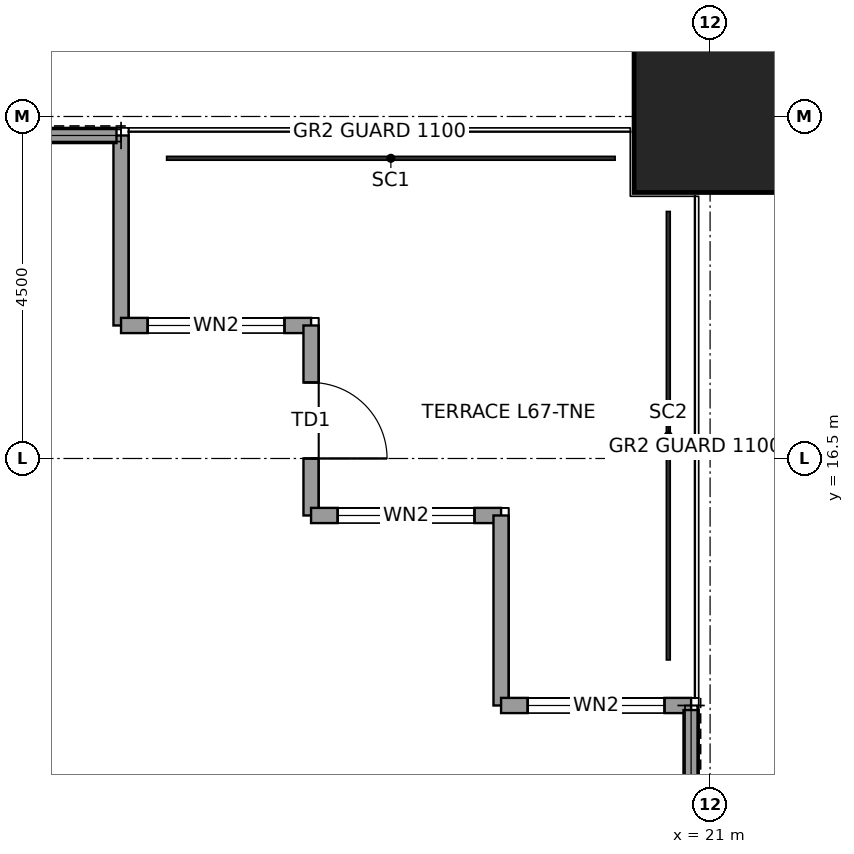
"""IFC4 building model, lengths in metres.
Left out: names, types, materials, properties, quantities, classifications, styles, units other than length and angle.
Written with IfcOpenShell. Run it as: python <this file> out.ifc"""

import sys

from ifc_helpers import new_model, si_unit, direction, frame, frame_2d, origin, origin_2d, place, context, subcontext, project, spatial, rectangle, hollow_rectangle, extrude, element, fill, save


model = new_model("IFC4")
c1 = context("Model", 3, precision=1e-05, world=origin(), true_north=direction((0.0, 1.0)))
c2 = subcontext(c1, "Body", "Model", "MODEL_VIEW")
j1 = project(units=[si_unit("LENGTHUNIT", "METRE"), si_unit("PLANEANGLEUNIT", "RADIAN")], contexts=[c1])
p1 = place(None, origin())
s1 = spatial("IfcSite", under=j1, at=p1, CompositionType="ELEMENT")
p2 = place(p1, origin())
s2 = spatial("IfcBuilding", under=s1, at=p2, CompositionType="ELEMENT")
p3 = place(p2, frame((0.0, 0.0, 303.9)))
s3 = spatial("IfcBuildingStorey", under=s2, at=p3, CompositionType="ELEMENT", Elevation=303.9)
p4 = place(p3, frame((21.0, 21.0, 0.0), z_axis=(0.0, 0.0, 1.0), x_axis=(1.0, 0.0, 0.0)))
e1 = element("IfcColumn", 1, at=p4, inside=s3, PredefinedType="COLUMN", context=c2, shape_type="SweptSolid", body=[
    extrude(hollow_rectangle(XDim=2.0, YDim=2.0, WallThickness=0.095, at=origin_2d()), origin(), (0.0, 0.0, 1.0), 4.0),
])
p5 = place(p3, frame((13.25, 20.75, 0.0), z_axis=(0.0, 0.0, 1.0), x_axis=(0.0, -1.0, 0.0)))
e2 = element("IfcWall", 2, at=p5, inside=s3, PredefinedType="SOLIDWALL", context=c2, shape_type="SweptSolid", body=[
    extrude(rectangle(XDim=2.5, YDim=0.2, at=frame_2d((1.25, 0.0))), origin(), (0.0, 0.0, 1.0), 3.85),
])
p6 = place(p3, frame((13.25, 18.25, 0.0), z_axis=(0.0, 0.0, 1.0), x_axis=(1.0, 0.0, 0.0)))
e3 = element("IfcWall", 3, at=p6, inside=s3, PredefinedType="SOLIDWALL", context=c2, shape_type="SweptSolid", body=[
    extrude(rectangle(XDim=2.5, YDim=0.2, at=frame_2d((1.25, 0.0))), origin(), (0.0, 0.0, 1.0), 3.85),
])
p7 = place(p6, frame((0.35, 0.0, 0.3)))
e4 = element("IfcOpeningElement", 4, at=p7, cuts=e3, PredefinedType="OPENING", context=c2, shape_type="SweptSolid", body=[
    extrude(rectangle(XDim=1.8, YDim=2.4, at=frame_2d((0.9, 1.2))), frame((0.0, 0.11, 0.0), z_axis=(0.0, -1.0, 0.0), x_axis=(1.0, 0.0, 0.0)), (0.0, 0.0, 1.0), 0.22),
])
p8 = place(p3, frame((15.75, 18.25, 0.0), z_axis=(0.0, 0.0, 1.0), x_axis=(0.0, -1.0, 0.0)))
e5 = element("IfcWall", 5, at=p8, inside=s3, PredefinedType="SOLIDWALL", context=c2, shape_type="SweptSolid", body=[
    extrude(rectangle(XDim=2.5, YDim=0.2, at=frame_2d((1.25, 0.0))), origin(), (0.0, 0.0, 1.0), 3.317),
])
p9 = place(p8, frame((0.75, 0.0, 0.0)))
e6 = element("IfcOpeningElement", 6, at=p9, cuts=e5, PredefinedType="OPENING", context=c2, shape_type="SweptSolid", body=[
    extrude(rectangle(XDim=1.0, YDim=2.4, at=frame_2d((0.5, 1.2))), frame((0.0, 0.11, 0.0), z_axis=(0.0, -1.0, 0.0), x_axis=(1.0, 0.0, 0.0)), (0.0, 0.0, 1.0), 0.22),
])
p10 = place(p3, frame((15.75, 15.75, 0.0), z_axis=(0.0, 0.0, 1.0), x_axis=(1.0, 0.0, 0.0)))
e7 = element("IfcWall", 7, at=p10, inside=s3, PredefinedType="SOLIDWALL", context=c2, shape_type="SweptSolid", body=[
    extrude(rectangle(XDim=2.5, YDim=0.2, at=frame_2d((1.25, 0.0))), origin(), (0.0, 0.0, 1.0), 3.85),
])
p11 = place(p10, frame((0.35, 0.0, 0.3)))
e8 = element("IfcOpeningElement", 8, at=p11, cuts=e7, PredefinedType="OPENING", context=c2, shape_type="SweptSolid", body=[
    extrude(rectangle(XDim=1.8, YDim=2.4, at=frame_2d((0.9, 1.2))), frame((0.0, 0.11, 0.0), z_axis=(0.0, -1.0, 0.0), x_axis=(1.0, 0.0, 0.0)), (0.0, 0.0, 1.0), 0.22),
])
p12 = place(p3, frame((18.25, 15.75, 0.0), z_axis=(0.0, 0.0, 1.0), x_axis=(0.0, -1.0, 0.0)))
e9 = element("IfcWall", 9, at=p12, inside=s3, PredefinedType="SOLIDWALL", context=c2, shape_type="SweptSolid", body=[
    extrude(rectangle(XDim=2.5, YDim=0.2, at=frame_2d((1.25, 0.0))), origin(), (0.0, 0.0, 1.0), 3.85),
])
p13 = place(p3, frame((18.25, 13.25, 0.0), z_axis=(0.0, 0.0, 1.0), x_axis=(1.0, 0.0, 0.0)))
e10 = element("IfcWall", 10, at=p13, inside=s3, PredefinedType="SOLIDWALL", context=c2, shape_type="SweptSolid", body=[
    extrude(rectangle(XDim=2.5, YDim=0.2, at=frame_2d((1.25, 0.0))), origin(), (0.0, 0.0, 1.0), 3.85),
])
p14 = place(p13, frame((0.35, 0.0, 0.3)))
e11 = element("IfcOpeningElement", 11, at=p14, cuts=e10, PredefinedType="OPENING", context=c2, shape_type="SweptSolid", body=[
    extrude(rectangle(XDim=1.8, YDim=2.4, at=frame_2d((0.9, 1.2))), frame((0.0, 0.11, 0.0), z_axis=(0.0, -1.0, 0.0), x_axis=(1.0, 0.0, 0.0)), (0.0, 0.0, 1.0), 0.22),
])
for number, where, z_axis, x_axis in (
    (12, (10.405, 20.75, 0.0), (0.0, 0.0, 1.0), (1.0, 0.0, 0.0)),
    (13, (20.75, 13.19, 0.0), (0.0, 0.0, 1.0), (0.0, -1.0, 0.0)),
):
    element("IfcWall", number, at=place(p3, frame(where, z_axis=z_axis, x_axis=x_axis)), inside=s3, PredefinedType="SOLIDWALL", context=c2, shape_type="SweptSolid", body=[
        extrude(rectangle(XDim=2.785, YDim=0.2, at=frame_2d((1.393, 0.0))), origin(), (0.0, 0.0, 1.0), 3.85),
    ])
p15 = place(p7, origin())
e14 = element("IfcWindow", 14, at=p15, inside=s3, PartitioningType="SINGLE_PANEL", PredefinedType="WINDOW", context=c2, shape_type="SweptSolid", body=[
    extrude(rectangle(XDim=1.8, YDim=2.4, at=frame_2d((0.9, 1.2))), frame((0.0, 0.03, 0.0), z_axis=(0.0, -1.0, 0.0), x_axis=(1.0, 0.0, 0.0)), (0.0, 0.0, 1.0), 0.06),
])
fill(e4, e14)
p16 = place(p9, origin())
e15 = element("IfcDoor", 15, at=p16, inside=s3, OperationType="SINGLE_SWING_RIGHT", PredefinedType="DOOR", context=c2, shape_type="SweptSolid", body=[
    extrude(rectangle(XDim=1.0, YDim=2.4, at=frame_2d((0.5, 1.2))), frame((0.0, 0.025, 0.0), z_axis=(0.0, -1.0, 0.0), x_axis=(1.0, 0.0, 0.0)), (0.0, 0.0, 1.0), 0.05),
])
fill(e6, e15)
p17 = place(p11, origin())
e16 = element("IfcWindow", 16, at=p17, inside=s3, PartitioningType="SINGLE_PANEL", PredefinedType="WINDOW", context=c2, shape_type="SweptSolid", body=[
    extrude(rectangle(XDim=1.8, YDim=2.4, at=frame_2d((0.9, 1.2))), frame((0.0, 0.03, 0.0), z_axis=(0.0, -1.0, 0.0), x_axis=(1.0, 0.0, 0.0)), (0.0, 0.0, 1.0), 0.06),
])
fill(e8, e16)
p18 = place(p14, origin())
e17 = element("IfcWindow", 17, at=p18, inside=s3, PartitioningType="SINGLE_PANEL", PredefinedType="WINDOW", context=c2, shape_type="SweptSolid", body=[
    extrude(rectangle(XDim=1.8, YDim=2.4, at=frame_2d((0.9, 1.2))), frame((0.0, 0.03, 0.0), z_axis=(0.0, -1.0, 0.0), x_axis=(1.0, 0.0, 0.0)), (0.0, 0.0, 1.0), 0.06),
])
fill(e11, e17)
save(model, sys.argv[1])
